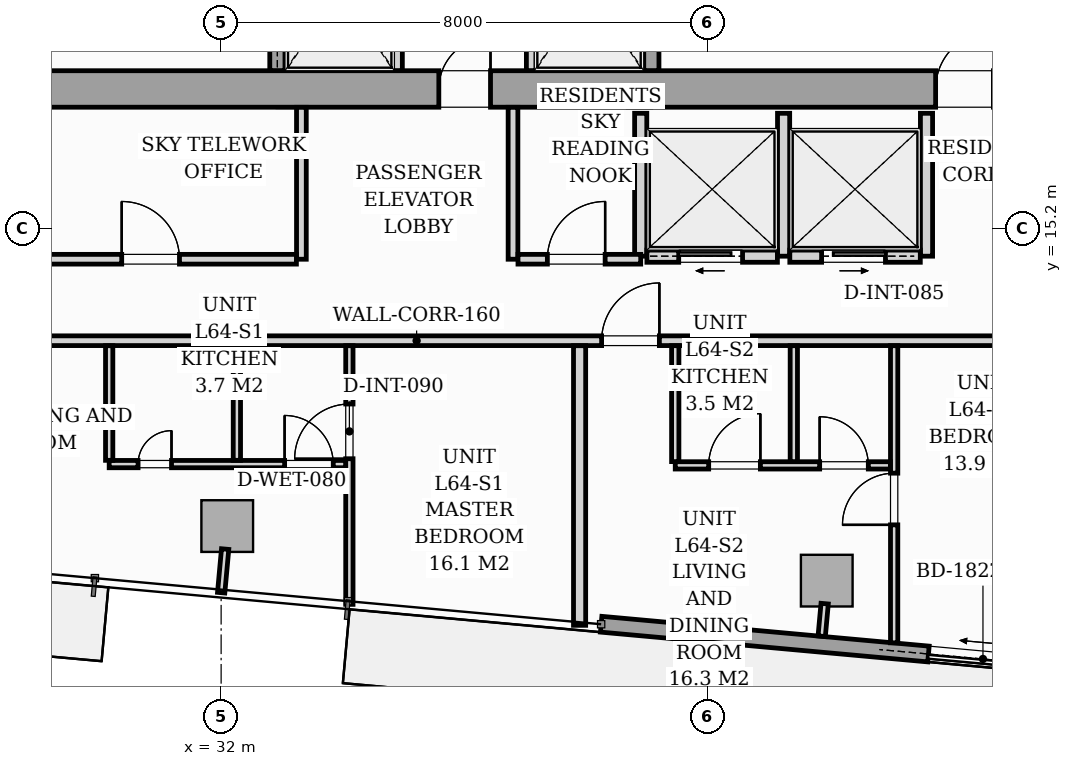
"""IFC4 building model, lengths in metres.
Left out: names, types, materials, properties, quantities, classifications, styles, units other than length and angle.
Written with IfcOpenShell. Run it as: python <this file> out.ifc"""

import sys

from ifc_helpers import new_model, si_unit, direction, frame, frame_2d, origin, origin_2d, place, context, subcontext, project, spatial, rectangle, i_section, extrude, source, transform, mapped, element, fill, save


model = new_model("IFC4")
c1 = context("Model", 3, precision=1e-05, world=origin(), true_north=direction((0.0, 1.0)))
c2 = subcontext(c1, "Body", "Model", "MODEL_VIEW")
j1 = project(units=[si_unit("LENGTHUNIT", "METRE"), si_unit("PLANEANGLEUNIT", "RADIAN")], contexts=[c1])
p1 = place(None, origin())
s1 = spatial("IfcSite", under=j1, at=p1, CompositionType="ELEMENT")
p2 = place(p1, origin())
s2 = spatial("IfcBuilding", under=s1, at=p2, CompositionType="ELEMENT")
p3 = place(p2, frame((0.0, 0.0, 223.2)))
s3 = spatial("IfcBuildingStorey", under=s2, at=p3, CompositionType="ELEMENT", Elevation=223.2)
m1 = source(origin(), c2, "Body", "SweptSolid", [
    extrude(i_section(OverallWidth=0.409, OverallDepth=0.425, WebThickness=0.033, FlangeThickness=0.052, FilletRadius=0.018, at=origin_2d()), origin(), (0.0, 0.0, 1.0), 3.296),
])
for number, where, z_axis, x_axis in (
    (1, (33.12, 17.4, 0.002), (0.0, 0.0, 1.0), (1.0, 0.0, 0.0)),
    (2, (38.88, 17.4, 0.002), (0.0, 0.0, 1.0), (1.0, 0.0, 0.0)),
):
    element("IfcColumn", number, at=place(p3, frame(where, z_axis=z_axis, x_axis=x_axis)), inside=s3, PredefinedType="PILASTER", context=c2, shape_type="MappedRepresentation", body=[
        mapped(m1, transform((0.0, 0.0, 0.0), scale=1.0)),
    ])
m2 = source(origin(), c2, "Body", "SweptSolid", [
    extrude(rectangle(XDim=0.85, YDim=0.85, at=origin_2d()), origin(), (0.0, 0.0, 1.0), 3.296),
])
for number, where, z_axis, x_axis in (
    (3, (32.1, 10.312, 0.002), (0.0, 0.0, 1.0), (0.996, -0.091, 0.0)),
    (4, (41.96, 9.415, 0.002), (0.0, 0.0, 1.0), (0.996, -0.091, 0.0)),
):
    element("IfcColumn", number, at=place(p3, frame(where, z_axis=z_axis, x_axis=x_axis)), inside=s3, PredefinedType="COLUMN", context=c2, shape_type="MappedRepresentation", body=[
        mapped(m2, transform((0.0, 0.0, 0.0), scale=1.0)),
    ])
p4 = place(p3, frame((52.819, 7.372, 0.0), z_axis=(0.0, 0.0, 1.0), x_axis=(-0.995884447498, 0.090632043071, 0.0)))
e5 = element("IfcWall", 5, at=p4, inside=s3, PredefinedType="STANDARD", context=c2, shape_type="SweptSolid", body=[
    extrude(rectangle(XDim=14.63, YDim=0.26, at=frame_2d((7.315, 0.0))), origin(), (0.0, 0.0, 1.0), 3.04),
])
p5 = place(p4, frame((7.425, 0.0, 0.0)))
e6 = element("IfcOpeningElement", 6, at=p5, cuts=e5, PredefinedType="OPENING", context=c2, shape_type="SweptSolid", body=[
    extrude(rectangle(XDim=1.8, YDim=2.06, at=frame_2d((0.9, 1.03))), frame((0.0, 0.14, 0.0), z_axis=(0.0, -1.0, 0.0), x_axis=(1.0, 0.0, 0.0)), (0.0, 0.0, 1.0), 0.28),
])
p6 = place(p4, frame((2.05, 0.0, 0.65)))
e7 = element("IfcOpeningElement", 7, at=p6, cuts=e5, PredefinedType="OPENING", context=c2, shape_type="SweptSolid", body=[
    extrude(rectangle(XDim=1.6, YDim=1.5, at=frame_2d((0.8, 0.75))), frame((0.0, 0.14, 0.0), z_axis=(0.0, -1.0, 0.0), x_axis=(1.0, 0.0, 0.0)), (0.0, 0.0, 1.0), 0.28),
])
p7 = place(p3, frame((26.2, 17.5, 0.0), z_axis=(0.0, 0.0, 1.0), x_axis=(1.0, 0.0, 0.0)))
e8 = element("IfcWall", 8, at=p7, inside=s3, PredefinedType="SHEAR", context=c2, shape_type="SweptSolid", body=[
    extrude(rectangle(XDim=19.6, YDim=0.6, at=frame_2d((9.8, 0.0))), origin(), (0.0, 0.0, 1.0), 3.3),
])
p8 = place(p7, frame((0.95, 0.0, 0.0)))
e9 = element("IfcOpeningElement", 9, at=p8, cuts=e8, PredefinedType="OPENING", context=c2, shape_type="SweptSolid", body=[
    extrude(rectangle(XDim=0.95, YDim=2.06, at=frame_2d((0.475, 1.03))), frame((0.0, 0.31, 0.0), z_axis=(0.0, -1.0, 0.0), x_axis=(1.0, 0.0, 0.0)), (0.0, 0.0, 1.0), 0.62),
])
p9 = place(p7, frame((9.38, 0.0, 0.0)))
e10 = element("IfcOpeningElement", 10, at=p9, cuts=e8, PredefinedType="OPENING", context=c2, shape_type="SweptSolid", body=[
    extrude(rectangle(XDim=0.85, YDim=2.0, at=frame_2d((0.425, 1.0))), frame((0.0, 0.31, 0.0), z_axis=(0.0, -1.0, 0.0), x_axis=(1.0, 0.0, 0.0)), (0.0, 0.0, 1.0), 0.62),
])
p10 = place(p7, frame((17.55, 0.0, 0.0)))
e11 = element("IfcOpeningElement", 11, at=p10, cuts=e8, PredefinedType="OPENING", context=c2, shape_type="SweptSolid", body=[
    extrude(rectangle(XDim=0.95, YDim=2.06, at=frame_2d((0.475, 1.03))), frame((0.0, 0.31, 0.0), z_axis=(0.0, -1.0, 0.0), x_axis=(1.0, 0.0, 0.0)), (0.0, 0.0, 1.0), 0.62),
])
p11 = place(p3, frame((32.925, 17.802, 0.0), z_axis=(0.0, 0.0, 1.0), x_axis=(0.0, 1.0, 0.0)))
e12 = element("IfcWall", 12, at=p11, inside=s3, PredefinedType="SOLIDWALL", context=c2, shape_type="SweptSolid", body=[
    extrude(rectangle(XDim=2.646, YDim=0.25, at=frame_2d((1.323, 0.0))), origin(), (0.0, 0.0, 1.0), 3.3),
])
p12 = place(p11, frame((0.548, 0.0, 0.0)))
e13 = element("IfcOpeningElement", 13, at=p12, cuts=e12, PredefinedType="OPENING", context=c2, shape_type="SweptSolid", body=[
    extrude(rectangle(XDim=1.1, YDim=2.08, at=frame_2d((0.55, 1.04))), frame((0.0, 0.135, 0.0), z_axis=(0.0, -1.0, 0.0), x_axis=(1.0, 0.0, 0.0)), (0.0, 0.0, 1.0), 0.27),
])
for number, where, z_axis, x_axis in (
    (14, (34.9, 17.802, 0.0), (0.0, 0.0, 1.0), (0.0, 1.0, 0.0)),
    (15, (37.1, 17.802, 0.0), (0.0, 0.0, 1.0), (0.0, 1.0, 0.0)),
):
    element("IfcWall", number, at=place(p3, frame(where, z_axis=z_axis, x_axis=x_axis)), inside=s3, PredefinedType="PARTITIONING", context=c2, shape_type="SweptSolid", body=[
        extrude(rectangle(XDim=2.646, YDim=0.16, at=frame_2d((1.323, 0.0))), origin(), (0.0, 0.0, 1.0), 3.04),
    ])
p13 = place(p3, frame((39.075, 17.802, 0.0), z_axis=(0.0, 0.0, 1.0), x_axis=(0.0, 1.0, 0.0)))
e16 = element("IfcWall", 16, at=p13, inside=s3, PredefinedType="SOLIDWALL", context=c2, shape_type="SweptSolid", body=[
    extrude(rectangle(XDim=2.646, YDim=0.25, at=frame_2d((1.323, 0.0))), origin(), (0.0, 0.0, 1.0), 3.3),
])
p14 = place(p13, frame((0.548, 0.0, 0.0)))
e17 = element("IfcOpeningElement", 17, at=p14, cuts=e16, PredefinedType="OPENING", context=c2, shape_type="SweptSolid", body=[
    extrude(rectangle(XDim=1.1, YDim=2.08, at=frame_2d((0.55, 1.04))), frame((0.0, 0.135, 0.0), z_axis=(0.0, -1.0, 0.0), x_axis=(1.0, 0.0, 0.0)), (0.0, 0.0, 1.0), 0.27),
])
for number, where, z_axis, x_axis in (
    (18, (38.9, 14.75, 0.0), (0.0, 0.0, 1.0), (0.0, 1.0, 0.0)),
    (19, (41.25, 14.75, 0.0), (0.0, 0.0, 1.0), (0.0, 1.0, 0.0)),
    (20, (43.6, 14.75, 0.0), (0.0, 0.0, 1.0), (0.0, 1.0, 0.0)),
):
    element("IfcWall", number, at=place(p3, frame(where, z_axis=z_axis, x_axis=x_axis)), inside=s3, PredefinedType="PARTITIONING", context=c2, shape_type="SweptSolid", body=[
        extrude(rectangle(XDim=2.35, YDim=0.2, at=frame_2d((1.175, 0.0))), origin(), (0.0, 0.0, 1.0), 3.04),
    ])
p15 = place(p3, frame((39.002, 14.75, 0.0), z_axis=(0.0, 0.0, 1.0), x_axis=(1.0, 0.0, 0.0)))
e21 = element("IfcWall", 21, at=p15, inside=s3, PredefinedType="PARTITIONING", context=c2, shape_type="SweptSolid", body=[
    extrude(rectangle(XDim=2.146, YDim=0.2, at=frame_2d((1.073, 0.0))), origin(), (0.0, 0.0, 1.0), 3.04),
])
p16 = place(p15, frame((0.523, 0.0, 0.0)))
e22 = element("IfcOpeningElement", 22, at=p16, cuts=e21, PredefinedType="OPENING", context=c2, shape_type="SweptSolid", body=[
    extrude(rectangle(XDim=1.05, YDim=2.08, at=frame_2d((0.525, 1.04))), frame((0.0, 0.11, 0.0), z_axis=(0.0, -1.0, 0.0), x_axis=(1.0, 0.0, 0.0)), (0.0, 0.0, 1.0), 0.22),
])
p17 = place(p3, frame((41.352, 14.75, 0.0), z_axis=(0.0, 0.0, 1.0), x_axis=(1.0, 0.0, 0.0)))
e23 = element("IfcWall", 23, at=p17, inside=s3, PredefinedType="PARTITIONING", context=c2, shape_type="SweptSolid", body=[
    extrude(rectangle(XDim=2.146, YDim=0.2, at=frame_2d((1.073, 0.0))), origin(), (0.0, 0.0, 1.0), 3.04),
])
p18 = place(p17, frame((0.523, 0.0, 0.0)))
e24 = element("IfcOpeningElement", 24, at=p18, cuts=e23, PredefinedType="OPENING", context=c2, shape_type="SweptSolid", body=[
    extrude(rectangle(XDim=1.05, YDim=2.08, at=frame_2d((0.525, 1.04))), frame((0.0, 0.11, 0.0), z_axis=(0.0, -1.0, 0.0), x_axis=(1.0, 0.0, 0.0)), (0.0, 0.0, 1.0), 0.22),
])
p19 = place(p3, frame((24.55, 13.36, 0.0), z_axis=(0.0, 0.0, 1.0), x_axis=(1.0, 0.0, 0.0)))
e25 = element("IfcWall", 25, at=p19, inside=s3, PredefinedType="PARTITIONING", context=c2, shape_type="SweptSolid", body=[
    extrude(rectangle(XDim=21.33, YDim=0.16, at=frame_2d((10.665, 0.0))), origin(), (0.0, 0.0, 1.0), 2.596),
])
p20 = place(p19, frame((2.37, 0.0, 0.0)))
e26 = element("IfcOpeningElement", 26, at=p20, cuts=e25, PredefinedType="OPENING", context=c2, shape_type="SweptSolid", body=[
    extrude(rectangle(XDim=0.95, YDim=2.06, at=frame_2d((0.475, 1.03))), frame((0.0, 0.09, 0.0), z_axis=(0.0, -1.0, 0.0), x_axis=(1.0, 0.0, 0.0)), (0.0, 0.0, 1.0), 0.18),
])
p21 = place(p19, frame((13.707, 0.0, 0.0)))
e27 = element("IfcOpeningElement", 27, at=p21, cuts=e25, PredefinedType="OPENING", context=c2, shape_type="SweptSolid", body=[
    extrude(rectangle(XDim=0.95, YDim=2.06, at=frame_2d((0.475, 1.03))), frame((0.0, 0.09, 0.0), z_axis=(0.0, -1.0, 0.0), x_axis=(1.0, 0.0, 0.0)), (0.0, 0.0, 1.0), 0.18),
])
p22 = place(p3, frame((34.109, 9.024, 0.0), z_axis=(0.0, 0.0, 1.0), x_axis=(0.0, 1.0, 0.0)))
e28 = element("IfcWall", 28, at=p22, inside=s3, PredefinedType="PARTITIONING", context=c2, shape_type="SweptSolid", body=[
    extrude(rectangle(XDim=4.254, YDim=0.12, at=frame_2d((2.127, 0.0))), origin(), (0.0, 0.0, 1.0), 3.04),
])
p23 = place(p22, frame((2.395, 0.0, 0.0)))
e29 = element("IfcOpeningElement", 29, at=p23, cuts=e28, PredefinedType="OPENING", context=c2, shape_type="SweptSolid", body=[
    extrude(rectangle(XDim=0.9, YDim=2.05, at=frame_2d((0.45, 1.025))), frame((0.0, 0.07, 0.0), z_axis=(0.0, -1.0, 0.0), x_axis=(1.0, 0.0, 0.0)), (0.0, 0.0, 1.0), 0.14),
])
p24 = place(p3, frame((30.159, 11.331, 0.0), z_axis=(0.0, 0.0, 1.0), x_axis=(1.0, 0.0, 0.0)))
e30 = element("IfcWall", 30, at=p24, inside=s3, PredefinedType="PARTITIONING", context=c2, shape_type="SweptSolid", body=[
    extrude(rectangle(XDim=3.888, YDim=0.12, at=frame_2d((1.944, 0.0))), origin(), (0.0, 0.0, 1.0), 2.596),
])
p25 = place(p24, frame((0.475, 0.0, 0.0)))
e31 = element("IfcOpeningElement", 31, at=p25, cuts=e30, PredefinedType="OPENING", context=c2, shape_type="SweptSolid", body=[
    extrude(rectangle(XDim=0.55, YDim=2.0, at=frame_2d((0.275, 1.0))), frame((0.0, 0.07, 0.0), z_axis=(0.0, -1.0, 0.0), x_axis=(1.0, 0.0, 0.0)), (0.0, 0.0, 1.0), 0.14),
])
p26 = place(p24, frame((2.885, 0.0, 0.0)))
e32 = element("IfcOpeningElement", 32, at=p26, cuts=e30, PredefinedType="OPENING", context=c2, shape_type="SweptSolid", body=[
    extrude(rectangle(XDim=0.8, YDim=2.02, at=frame_2d((0.4, 1.01))), frame((0.0, 0.07, 0.0), z_axis=(0.0, -1.0, 0.0), x_axis=(1.0, 0.0, 0.0)), (0.0, 0.0, 1.0), 0.14),
])
p27 = place(p3, frame((32.259, 11.393, 0.0), z_axis=(0.0, 0.0, 1.0), x_axis=(0.0, 1.0, 0.0)))
e33 = element("IfcWall", 33, at=p27, inside=s3, PredefinedType="PARTITIONING", context=c2, shape_type="SweptSolid", body=[
    extrude(rectangle(XDim=1.885, YDim=0.12, at=frame_2d((0.942, 0.0))), origin(), (0.0, 0.0, 1.0), 2.4),
])
p28 = place(p3, frame((30.159, 11.393, 0.0), z_axis=(0.0, 0.0, 1.0), x_axis=(0.0, 1.0, 0.0)))
e34 = element("IfcWall", 34, at=p28, inside=s3, PredefinedType="PARTITIONING", context=c2, shape_type="SweptSolid", body=[
    extrude(rectangle(XDim=1.885, YDim=0.12, at=frame_2d((0.942, 0.0))), origin(), (0.0, 0.0, 1.0), 3.04),
])
p29 = place(p3, frame((37.895, 8.68, 0.0), z_axis=(0.0, 0.0, 1.0), x_axis=(0.0, 1.0, 0.0)))
e35 = element("IfcWall", 35, at=p29, inside=s3, PredefinedType="PARTITIONING", context=c2, shape_type="SweptSolid", body=[
    extrude(rectangle(XDim=4.598, YDim=0.2, at=frame_2d((2.299, 0.0))), origin(), (0.0, 0.0, 1.0), 3.04),
])
p30 = place(p3, frame((43.068, 8.392, 0.0), z_axis=(0.0, 0.0, 1.0), x_axis=(0.0, 1.0, 0.0)))
e36 = element("IfcWall", 36, at=p30, inside=s3, PredefinedType="PARTITIONING", context=c2, shape_type="SweptSolid", body=[
    extrude(rectangle(XDim=4.886, YDim=0.12, at=frame_2d((2.443, 0.0))), origin(), (0.0, 0.0, 1.0), 3.04),
])
p31 = place(p30, frame((1.94, 0.0, 0.0)))
e37 = element("IfcOpeningElement", 37, at=p31, cuts=e36, PredefinedType="OPENING", context=c2, shape_type="SweptSolid", body=[
    extrude(rectangle(XDim=0.85, YDim=2.05, at=frame_2d((0.425, 1.025))), frame((0.0, 0.07, 0.0), z_axis=(0.0, -1.0, 0.0), x_axis=(1.0, 0.0, 0.0)), (0.0, 0.0, 1.0), 0.14),
])
p32 = place(p3, frame((39.468, 11.31, 0.0), z_axis=(0.0, 0.0, 1.0), x_axis=(1.0, 0.0, 0.0)))
e38 = element("IfcWall", 38, at=p32, inside=s3, PredefinedType="PARTITIONING", context=c2, shape_type="SweptSolid", body=[
    extrude(rectangle(XDim=3.538, YDim=0.12, at=frame_2d((1.769, 0.0))), origin(), (0.0, 0.0, 1.0), 3.04),
])
p33 = place(p32, frame((0.55, 0.0, 0.0)))
e39 = element("IfcOpeningElement", 39, at=p33, cuts=e38, PredefinedType="OPENING", context=c2, shape_type="SweptSolid", body=[
    extrude(rectangle(XDim=0.85, YDim=2.05, at=frame_2d((0.425, 1.025))), frame((0.0, 0.07, 0.0), z_axis=(0.0, -1.0, 0.0), x_axis=(1.0, 0.0, 0.0)), (0.0, 0.0, 1.0), 0.14),
])
p34 = place(p32, frame((2.375, 0.0, 0.0)))
e40 = element("IfcOpeningElement", 40, at=p34, cuts=e38, PredefinedType="OPENING", context=c2, shape_type="SweptSolid", body=[
    extrude(rectangle(XDim=0.8, YDim=2.02, at=frame_2d((0.4, 1.01))), frame((0.0, 0.07, 0.0), z_axis=(0.0, -1.0, 0.0), x_axis=(1.0, 0.0, 0.0)), (0.0, 0.0, 1.0), 0.14),
])
for number, where, z_axis, x_axis in (
    (41, (39.468, 11.372, 0.0), (0.0, 0.0, 1.0), (0.0, 1.0, 0.0)),
    (42, (41.418, 11.372, 0.0), (0.0, 0.0, 1.0), (0.0, 1.0, 0.0)),
):
    element("IfcWall", number, at=place(p3, frame(where, z_axis=z_axis, x_axis=x_axis)), inside=s3, PredefinedType="PARTITIONING", context=c2, shape_type="SweptSolid", body=[
        extrude(rectangle(XDim=1.906, YDim=0.12, at=frame_2d((0.953, 0.0))), origin(), (0.0, 0.0, 1.0), 3.04),
    ])
p35 = place(p3, frame((33.32, 14.7, 0.0), z_axis=(0.0, 0.0, 1.0), x_axis=(0.0, 1.0, 0.0)))
e43 = element("IfcWall", 43, at=p35, inside=s3, PredefinedType="PARTITIONING", context=c2, shape_type="SweptSolid", body=[
    extrude(rectangle(XDim=2.498, YDim=0.16, at=frame_2d((1.249, 0.0))), origin(), (0.0, 0.0, 1.0), 3.04),
])
p36 = place(p3, frame((28.442, 14.7, 0.0), z_axis=(0.0, 0.0, 1.0), x_axis=(1.0, 0.0, 0.0)))
e44 = element("IfcWall", 44, at=p36, inside=s3, PredefinedType="PARTITIONING", context=c2, shape_type="SweptSolid", body=[
    extrude(rectangle(XDim=4.796, YDim=0.16, at=frame_2d((2.398, 0.0))), origin(), (0.0, 0.0, 1.0), 2.596),
])
p37 = place(p36, frame((1.923, 0.0, 0.0)))
e45 = element("IfcOpeningElement", 45, at=p37, cuts=e44, PredefinedType="OPENING", context=c2, shape_type="SweptSolid", body=[
    extrude(rectangle(XDim=0.95, YDim=2.06, at=frame_2d((0.475, 1.03))), frame((0.0, 0.09, 0.0), z_axis=(0.0, -1.0, 0.0), x_axis=(1.0, 0.0, 0.0)), (0.0, 0.0, 1.0), 0.18),
])
p38 = place(p3, frame((36.8, 14.7, 0.0), z_axis=(0.0, 0.0, 1.0), x_axis=(0.0, 1.0, 0.0)))
e46 = element("IfcWall", 46, at=p38, inside=s3, PredefinedType="PARTITIONING", context=c2, shape_type="SweptSolid", body=[
    extrude(rectangle(XDim=2.498, YDim=0.16, at=frame_2d((1.249, 0.0))), origin(), (0.0, 0.0, 1.0), 3.04),
])
p39 = place(p3, frame((36.882, 14.7, 0.0), z_axis=(0.0, 0.0, 1.0), x_axis=(1.0, 0.0, 0.0)))
e47 = element("IfcWall", 47, at=p39, inside=s3, PredefinedType="PARTITIONING", context=c2, shape_type="SweptSolid", body=[
    extrude(rectangle(XDim=2.018, YDim=0.16, at=frame_2d((1.009, 0.0))), origin(), (0.0, 0.0, 1.0), 3.04),
])
p40 = place(p39, frame((0.483, 0.0, 0.0)))
e48 = element("IfcOpeningElement", 48, at=p40, cuts=e47, PredefinedType="OPENING", context=c2, shape_type="SweptSolid", body=[
    extrude(rectangle(XDim=0.95, YDim=2.06, at=frame_2d((0.475, 1.03))), frame((0.0, 0.09, 0.0), z_axis=(0.0, -1.0, 0.0), x_axis=(1.0, 0.0, 0.0)), (0.0, 0.0, 1.0), 0.18),
])
p41 = place(p3, frame((32.066, 9.933, 0.0), z_axis=(0.0, 0.0, 1.0), x_axis=(-0.090872036342, -0.995862577373, 0.0)))
e49 = element("IfcWall", 49, at=p41, inside=s3, PredefinedType="PARTITIONING", context=c2, shape_type="SweptSolid", body=[
    extrude(rectangle(XDim=0.72, YDim=0.12, at=frame_2d((0.36, 0.0))), origin(), (0.0, 0.0, 1.0), 3.04),
])
p42 = place(p3, frame((41.925, 9.036, 0.0), z_axis=(0.0, 0.0, 1.0), x_axis=(-0.090740281653, -0.995874591144, 0.0)))
e50 = element("IfcWall", 50, at=p42, inside=s3, PredefinedType="PARTITIONING", context=c2, shape_type="SweptSolid", body=[
    extrude(rectangle(XDim=0.538, YDim=0.12, at=frame_2d((0.269, 0.0))), origin(), (0.0, 0.0, 1.0), 3.04),
])
m3 = source(origin(), c2, "Body", "SweptSolid", [
    extrude(rectangle(XDim=1.8, YDim=2.06, at=frame_2d((0.9, 1.03))), frame((0.0, 0.025, 0.0), z_axis=(0.0, -1.0, 0.0), x_axis=(1.0, 0.0, 0.0)), (0.0, 0.0, 1.0), 0.05),
])
p43 = place(p5, origin())
e51 = element("IfcDoor", 51, at=p43, inside=s3, OperationType="SLIDING_TO_RIGHT", PredefinedType="DOOR", context=c2, shape_type="MappedRepresentation", body=[
    mapped(m3, transform((0.0, 0.0, 0.0), scale=1.0)),
])
fill(e6, e51)
m4 = source(origin(), c2, "Body", "SweptSolid", [
    extrude(rectangle(XDim=0.85, YDim=2.0, at=frame_2d((0.425, 1.0))), frame((0.0, 0.025, 0.0), z_axis=(0.0, -1.0, 0.0), x_axis=(1.0, 0.0, 0.0)), (0.0, 0.0, 1.0), 0.05),
])
p44 = place(p9, origin())
e52 = element("IfcDoor", 52, at=p44, inside=s3, OperationType="SINGLE_SWING_RIGHT", PredefinedType="DOOR", context=c2, shape_type="MappedRepresentation", body=[
    mapped(m4, transform((0.0, 0.0, 0.0), scale=1.0)),
])
fill(e10, e52)
m5 = source(origin(), c2, "Body", "SweptSolid", [
    extrude(rectangle(XDim=0.95, YDim=2.06, at=frame_2d((0.475, 1.03))), frame((0.0, 0.025, 0.0), z_axis=(0.0, -1.0, 0.0), x_axis=(1.0, 0.0, 0.0)), (0.0, 0.0, 1.0), 0.05),
])
p45 = place(p10, origin())
e53 = element("IfcDoor", 53, at=p45, inside=s3, OperationType="SINGLE_SWING_RIGHT", PredefinedType="DOOR", context=c2, shape_type="MappedRepresentation", body=[
    mapped(m5, transform((0.0, 0.0, 0.0), scale=1.0)),
])
fill(e11, e53)
m6 = source(origin(), c2, "Body", "SweptSolid", [
    extrude(rectangle(XDim=1.05, YDim=2.08, at=frame_2d((0.525, 1.04))), frame((0.0, 0.025, 0.0), z_axis=(0.0, -1.0, 0.0), x_axis=(1.0, 0.0, 0.0)), (0.0, 0.0, 1.0), 0.05),
])
p46 = place(p16, origin())
e54 = element("IfcDoor", 54, at=p46, inside=s3, OperationType="SLIDING_TO_LEFT", PredefinedType="DOOR", context=c2, shape_type="MappedRepresentation", body=[
    mapped(m6, transform((0.0, 0.0, 0.0), scale=1.0)),
])
fill(e22, e54)
p47 = place(p18, origin())
e55 = element("IfcDoor", 55, at=p47, inside=s3, OperationType="SLIDING_TO_RIGHT", PredefinedType="DOOR", context=c2, shape_type="MappedRepresentation", body=[
    mapped(m6, transform((0.0, 0.0, 0.0), scale=1.0)),
])
fill(e24, e55)
m7 = source(origin(), c2, "Body", "SweptSolid", [
    extrude(rectangle(XDim=0.9, YDim=2.05, at=frame_2d((0.45, 1.025))), frame((0.0, 0.025, 0.0), z_axis=(0.0, -1.0, 0.0), x_axis=(1.0, 0.0, 0.0)), (0.0, 0.0, 1.0), 0.05),
])
p48 = place(p23, origin())
e56 = element("IfcDoor", 56, at=p48, inside=s3, OperationType="SINGLE_SWING_LEFT", PredefinedType="DOOR", context=c2, shape_type="MappedRepresentation", body=[
    mapped(m7, transform((0.0, 0.0, 0.0), scale=1.0)),
])
fill(e29, e56)
m8 = source(origin(), c2, "Body", "SweptSolid", [
    extrude(rectangle(XDim=0.55, YDim=2.0, at=frame_2d((0.275, 1.0))), frame((0.0, 0.025, 0.0), z_axis=(0.0, -1.0, 0.0), x_axis=(1.0, 0.0, 0.0)), (0.0, 0.0, 1.0), 0.05),
])
p49 = place(p25, origin())
e57 = element("IfcDoor", 57, at=p49, inside=s3, OperationType="SINGLE_SWING_RIGHT", PredefinedType="DOOR", context=c2, shape_type="MappedRepresentation", body=[
    mapped(m8, transform((0.0, 0.0, 0.0), scale=1.0)),
])
fill(e31, e57)
m9 = source(origin(), c2, "Body", "SweptSolid", [
    extrude(rectangle(XDim=0.8, YDim=2.02, at=frame_2d((0.4, 1.01))), frame((0.0, 0.025, 0.0), z_axis=(0.0, -1.0, 0.0), x_axis=(1.0, 0.0, 0.0)), (0.0, 0.0, 1.0), 0.05),
])
p50 = place(p26, origin())
e58 = element("IfcDoor", 58, at=p50, inside=s3, OperationType="SINGLE_SWING_LEFT", PredefinedType="DOOR", context=c2, shape_type="MappedRepresentation", body=[
    mapped(m9, transform((0.0, 0.0, 0.0), scale=1.0)),
])
fill(e32, e58)
m10 = source(origin(), c2, "Body", "SweptSolid", [
    extrude(rectangle(XDim=0.95, YDim=2.06, at=frame_2d((0.475, 1.03))), frame((0.0, 0.025, 0.0), z_axis=(0.0, -1.0, 0.0), x_axis=(1.0, 0.0, 0.0)), (0.0, 0.0, 1.0), 0.05),
])
p51 = place(p21, origin())
e59 = element("IfcDoor", 59, at=p51, inside=s3, OperationType="SINGLE_SWING_RIGHT", PredefinedType="DOOR", context=c2, shape_type="MappedRepresentation", body=[
    mapped(m10, transform((0.0, 0.0, 0.0), scale=1.0)),
])
fill(e27, e59)
m11 = source(origin(), c2, "Body", "SweptSolid", [
    extrude(rectangle(XDim=0.85, YDim=2.05, at=frame_2d((0.425, 1.025))), frame((0.0, 0.025, 0.0), z_axis=(0.0, -1.0, 0.0), x_axis=(1.0, 0.0, 0.0)), (0.0, 0.0, 1.0), 0.05),
])
p52 = place(p31, origin())
e60 = element("IfcDoor", 60, at=p52, inside=s3, OperationType="SINGLE_SWING_LEFT", PredefinedType="DOOR", context=c2, shape_type="MappedRepresentation", body=[
    mapped(m11, transform((0.0, 0.0, 0.0), scale=1.0)),
])
fill(e37, e60)
p53 = place(p33, origin())
e61 = element("IfcDoor", 61, at=p53, inside=s3, OperationType="SINGLE_SWING_RIGHT", PredefinedType="DOOR", context=c2, shape_type="MappedRepresentation", body=[
    mapped(m11, transform((0.0, 0.0, 0.0), scale=1.0)),
])
fill(e39, e61)
p54 = place(p34, origin())
e62 = element("IfcDoor", 62, at=p54, inside=s3, OperationType="SINGLE_SWING_LEFT", PredefinedType="DOOR", context=c2, shape_type="MappedRepresentation", body=[
    mapped(m9, transform((0.0, 0.0, 0.0), scale=1.0)),
])
fill(e40, e62)
p55 = place(p37, origin())
e63 = element("IfcDoor", 63, at=p55, inside=s3, OperationType="SINGLE_SWING_LEFT", PredefinedType="DOOR", context=c2, shape_type="MappedRepresentation", body=[
    mapped(m10, transform((0.0, 0.0, 0.0), scale=1.0)),
])
fill(e45, e63)
p56 = place(p40, origin())
e64 = element("IfcDoor", 64, at=p56, inside=s3, OperationType="SINGLE_SWING_RIGHT", PredefinedType="DOOR", context=c2, shape_type="MappedRepresentation", body=[
    mapped(m10, transform((0.0, 0.0, 0.0), scale=1.0)),
])
fill(e48, e64)
save(model, sys.argv[1])
